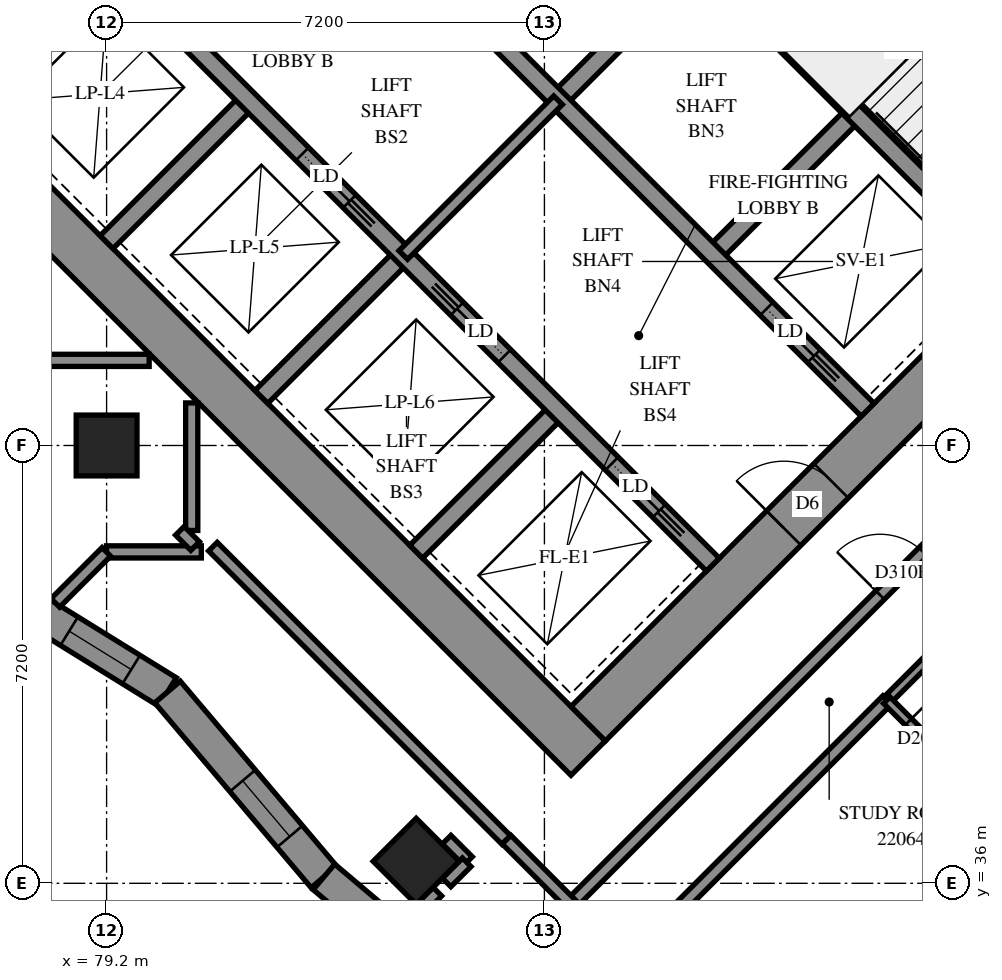
"""IFC4 building model, lengths in metres.
Left out: names, types, materials, properties, quantities, classifications, styles, units other than length and angle.
Written with IfcOpenShell. Run it as: python <this file> out.ifc"""

import sys

from ifc_helpers import new_model, si_unit, direction, frame, frame_2d, origin, origin_2d, place, context, subcontext, project, spatial, polyline, rectangle, outline, extrude, element, fill, save


model = new_model("IFC4")
c1 = context("Model", 3, precision=1e-05, world=origin(), true_north=direction((0.0, 1.0)))
c2 = subcontext(c1, "Body", "Model", "MODEL_VIEW")
j1 = project(units=[si_unit("LENGTHUNIT", "METRE"), si_unit("PLANEANGLEUNIT", "RADIAN")], contexts=[c1])
p1 = place(None, origin())
s1 = spatial("IfcSite", under=j1, at=p1, CompositionType="ELEMENT")
p2 = place(p1, origin())
s2 = spatial("IfcBuilding", under=s1, at=p2, CompositionType="ELEMENT")
p3 = place(p2, frame((0.0, 0.0, 84.6)))
s3 = spatial("IfcBuildingStorey", under=s2, at=p3, CompositionType="ELEMENT", Elevation=84.6)
for number, where, z_axis, x_axis in (
    (1, (79.2, 43.2, 0.0), (0.0, 0.0, 1.0), (1.0, 0.0, 0.0)),
    (2, (84.291, 36.362, 0.0), (0.0, 0.0, 1.0), (0.707, -0.707, 0.0)),
):
    element("IfcColumn", number, at=place(p3, frame(where, z_axis=z_axis, x_axis=x_axis)), inside=s3, PredefinedType="COLUMN", context=c2, shape_type="SweptSolid", body=[
        extrude(rectangle(XDim=1.0, YDim=1.0, at=origin_2d()), origin(), (0.0, 0.0, 1.0), 3.1),
    ])
p4 = place(p3, frame((75.806, 49.373, -0.3), z_axis=(0.0, 0.0, 1.0), x_axis=(0.7071067812, -0.7071067812, 0.0)))
e3 = element("IfcWall", 3, at=p4, inside=s3, PredefinedType="SHEAR", context=c2, shape_type="SweptSolid", body=[
    extrude(rectangle(XDim=16.0, YDim=0.8, at=frame_2d((8.0, 0.0))), origin(), (0.0, 0.0, 1.0), 2.7),
])
p5 = place(p3, frame((86.554, 60.121, -0.3), z_axis=(0.0, 0.0, 1.0), x_axis=(0.7071067812, -0.7071067812, 0.0)))
e4 = element("IfcWall", 4, at=p5, inside=s3, PredefinedType="SHEAR", context=c2, shape_type="SweptSolid", body=[
    extrude(rectangle(XDim=16.0, YDim=0.8, at=frame_2d((8.0, 0.0))), origin(), (0.0, 0.0, 1.0), 2.7),
])
p6 = place(p5, frame((10.8, 0.0, 0.3)))
e5 = element("IfcOpeningElement", 5, at=p6, cuts=e4, PredefinedType="OPENING", context=c2, shape_type="SweptSolid", body=[
    extrude(rectangle(XDim=0.8, YDim=2.1, at=frame_2d((0.4, 1.05))), frame((0.0, 0.41, 0.0), z_axis=(0.0, -1.0, 0.0), x_axis=(1.0, 0.0, 0.0)), (0.0, 0.0, 1.0), 0.82),
])
p7 = place(p3, frame((76.372, 49.373, -0.3), z_axis=(0.0, 0.0, 1.0), x_axis=(0.7071067812, 0.7071067812, 0.0)))
e6 = element("IfcWall", 6, at=p7, inside=s3, PredefinedType="SHEAR", context=c2, shape_type="SweptSolid", body=[
    extrude(rectangle(XDim=14.4, YDim=0.8, at=frame_2d((7.2, 0.0))), origin(), (0.0, 0.0, 1.0), 2.7),
])
p8 = place(p7, frame((4.55, 0.0, 0.3)))
e7 = element("IfcOpeningElement", 7, at=p8, cuts=e6, PredefinedType="OPENING", context=c2, shape_type="SweptSolid", body=[
    extrude(rectangle(XDim=1.1, YDim=2.1, at=frame_2d((0.55, 1.05))), frame((0.0, 0.41, 0.0), z_axis=(0.0, -1.0, 0.0), x_axis=(1.0, 0.0, 0.0)), (0.0, 0.0, 1.0), 0.82),
])
p9 = place(p7, frame((11.35, 0.0, 0.3)))
e8 = element("IfcOpeningElement", 8, at=p9, cuts=e6, PredefinedType="OPENING", context=c2, shape_type="SweptSolid", body=[
    extrude(rectangle(XDim=1.1, YDim=2.1, at=frame_2d((0.55, 1.05))), frame((0.0, 0.41, 0.0), z_axis=(0.0, -1.0, 0.0), x_axis=(1.0, 0.0, 0.0)), (0.0, 0.0, 1.0), 0.82),
])
p10 = place(p3, frame((87.12, 38.625, -0.3), z_axis=(0.0, 0.0, 1.0), x_axis=(0.7071067812, 0.7071067812, 0.0)))
e9 = element("IfcWall", 9, at=p10, inside=s3, PredefinedType="SHEAR", context=c2, shape_type="SweptSolid", body=[
    extrude(rectangle(XDim=14.4, YDim=0.8, at=frame_2d((7.2, 0.0))), origin(), (0.0, 0.0, 1.0), 2.7),
])
p11 = place(p10, frame((4.55, 0.0, 0.3)))
e10 = element("IfcOpeningElement", 10, at=p11, cuts=e9, PredefinedType="OPENING", context=c2, shape_type="SweptSolid", body=[
    extrude(rectangle(XDim=1.1, YDim=2.1, at=frame_2d((0.55, 1.05))), frame((0.0, 0.41, 0.0), z_axis=(0.0, -1.0, 0.0), x_axis=(1.0, 0.0, 0.0)), (0.0, 0.0, 1.0), 0.82),
])
p12 = place(p10, frame((11.35, 0.0, 0.3)))
e11 = element("IfcOpeningElement", 11, at=p12, cuts=e9, PredefinedType="OPENING", context=c2, shape_type="SweptSolid", body=[
    extrude(rectangle(XDim=1.1, YDim=2.1, at=frame_2d((0.55, 1.05))), frame((0.0, 0.41, 0.0), z_axis=(0.0, -1.0, 0.0), x_axis=(1.0, 0.0, 0.0)), (0.0, 0.0, 1.0), 0.82),
])
p13 = place(p3, frame((79.2, 46.544, 0.0), z_axis=(0.0, 0.0, 1.0), x_axis=(0.7071219326, 0.7070916295, 0.0)))
e12 = element("IfcWall", 12, at=p13, inside=s3, PredefinedType="SOLIDWALL", context=c2, shape_type="SweptSolid", body=[
    extrude(rectangle(XDim=3.3, YDim=0.3, at=frame_2d((1.65, 0.0))), origin(), (0.0, 0.0, 1.0), 3.1),
])
p14 = place(p3, frame((81.746, 43.999, 0.0), z_axis=(0.0, 0.0, 1.0), x_axis=(0.7071067812, 0.7071067812, 0.0)))
e13 = element("IfcWall", 13, at=p14, inside=s3, PredefinedType="SOLIDWALL", context=c2, shape_type="SweptSolid", body=[
    extrude(rectangle(XDim=3.3, YDim=0.3, at=frame_2d((1.65, 0.0))), origin(), (0.0, 0.0, 1.0), 3.1),
])
p15 = place(p3, frame((86.625, 48.878, 0.0), z_axis=(0.0, 0.0, 1.0), x_axis=(0.7071067812, 0.7071067812, 0.0)))
e14 = element("IfcWall", 14, at=p15, inside=s3, PredefinedType="SOLIDWALL", context=c2, shape_type="SweptSolid", body=[
    extrude(rectangle(XDim=3.3, YDim=0.3, at=frame_2d((1.65, 0.0))), origin(), (0.0, 0.0, 1.0), 3.1),
])
p16 = place(p3, frame((84.291, 41.453, 0.0), z_axis=(0.0, 0.0, 1.0), x_axis=(0.7071067812, 0.7071067812, 0.0)))
e15 = element("IfcWall", 15, at=p16, inside=s3, PredefinedType="SOLIDWALL", context=c2, shape_type="SweptSolid", body=[
    extrude(rectangle(XDim=3.3, YDim=0.3, at=frame_2d((1.65, 0.0))), origin(), (0.0, 0.0, 1.0), 3.1),
])
p17 = place(p3, frame((89.17, 46.332, 0.0), z_axis=(0.0, 0.0, 1.0), x_axis=(0.7071067812, 0.7071067812, 0.0)))
e16 = element("IfcWall", 16, at=p17, inside=s3, PredefinedType="SOLIDWALL", context=c2, shape_type="SweptSolid", body=[
    extrude(rectangle(XDim=3.3, YDim=0.3, at=frame_2d((1.65, 0.0))), origin(), (0.0, 0.0, 1.0), 3.1),
])
p18 = place(p3, frame((78.988, 51.423, 0.0), z_axis=(0.0, 0.0, 1.0), x_axis=(0.7071067812, -0.7071067812, 0.0)))
e17 = element("IfcWall", 17, at=p18, inside=s3, PredefinedType="SOLIDWALL", context=c2, shape_type="SweptSolid", body=[
    extrude(rectangle(XDim=14.4, YDim=0.3, at=frame_2d((7.2, 0.0))), origin(), (0.0, 0.0, 1.0), 3.1),
])
p19 = place(p18, frame((1.25, 0.0, 0.0)))
e18 = element("IfcOpeningElement", 18, at=p19, cuts=e17, PredefinedType="OPENING", context=c2, shape_type="SweptSolid", body=[
    extrude(rectangle(XDim=1.1, YDim=2.1, at=frame_2d((0.55, 1.05))), frame((0.0, 0.16, 0.0), z_axis=(0.0, -1.0, 0.0), x_axis=(1.0, 0.0, 0.0)), (0.0, 0.0, 1.0), 0.32),
])
p20 = place(p18, frame((4.85, 0.0, 0.0)))
e19 = element("IfcOpeningElement", 19, at=p20, cuts=e17, PredefinedType="OPENING", context=c2, shape_type="SweptSolid", body=[
    extrude(rectangle(XDim=1.1, YDim=2.1, at=frame_2d((0.55, 1.05))), frame((0.0, 0.16, 0.0), z_axis=(0.0, -1.0, 0.0), x_axis=(1.0, 0.0, 0.0)), (0.0, 0.0, 1.0), 0.32),
])
p21 = place(p18, frame((8.45, 0.0, 0.0)))
e20 = element("IfcOpeningElement", 20, at=p21, cuts=e17, PredefinedType="OPENING", context=c2, shape_type="SweptSolid", body=[
    extrude(rectangle(XDim=1.1, YDim=2.1, at=frame_2d((0.55, 1.05))), frame((0.0, 0.16, 0.0), z_axis=(0.0, -1.0, 0.0), x_axis=(1.0, 0.0, 0.0)), (0.0, 0.0, 1.0), 0.32),
])
p22 = place(p18, frame((12.05, 0.0, 0.0)))
e21 = element("IfcOpeningElement", 21, at=p22, cuts=e17, PredefinedType="OPENING", context=c2, shape_type="SweptSolid", body=[
    extrude(rectangle(XDim=1.1, YDim=2.1, at=frame_2d((0.55, 1.05))), frame((0.0, 0.16, 0.0), z_axis=(0.0, -1.0, 0.0), x_axis=(1.0, 0.0, 0.0)), (0.0, 0.0, 1.0), 0.32),
])
p23 = place(p3, frame((81.534, 53.969, 0.0), z_axis=(0.0, 0.0, 1.0), x_axis=(0.707103309, -0.7071102534, 0.0)))
e22 = element("IfcWall", 22, at=p23, inside=s3, PredefinedType="SOLIDWALL", context=c2, shape_type="SweptSolid", body=[
    extrude(rectangle(XDim=14.4, YDim=0.3, at=frame_2d((7.2, 0.0))), origin(), (0.0, 0.0, 1.0), 3.1),
])
p24 = place(p23, frame((12.05, 0.0, 0.0)))
e23 = element("IfcOpeningElement", 23, at=p24, cuts=e22, PredefinedType="OPENING", context=c2, shape_type="SweptSolid", body=[
    extrude(rectangle(XDim=1.1, YDim=2.1, at=frame_2d((0.55, 1.05))), frame((0.0, 0.16, 0.0), z_axis=(0.0, -1.0, 0.0), x_axis=(1.0, 0.0, 0.0)), (0.0, 0.0, 1.0), 0.32),
])
p25 = place(p3, frame((88.958, 51.211, 0.0), z_axis=(0.0, 0.0, 1.0), x_axis=(0.7070998367, -0.7071137256, 0.0)))
e24 = element("IfcWall", 24, at=p25, inside=s3, PredefinedType="SOLIDWALL", context=c2, shape_type="SweptSolid", body=[
    extrude(rectangle(XDim=7.2, YDim=0.3, at=frame_2d((3.6, 0.0))), origin(), (0.0, 0.0, 1.0), 3.1),
])
p26 = place(p3, frame((76.681, 41.325, 0.0), z_axis=(0.0, 0.0, 1.0), x_axis=(0.8503819746, -0.5261658458, 0.0)))
e25 = element("IfcWall", 25, at=p26, inside=s3, PredefinedType="SOLIDWALL", context=c2, shape_type="SweptSolid", body=[
    extrude(outline(polyline([(0.04, -0.275), (4.097, -0.275), (4.184, 0.275), (-0.04, 0.275), (0.04, -0.275)])), origin(), (0.0, 0.0, 1.0), 3.1),
])
p27 = place(p26, frame((0.368, 0.0, 0.5)))
e26 = element("IfcOpeningElement", 26, at=p27, cuts=e25, PredefinedType="OPENING", context=c2, shape_type="SweptSolid", body=[
    extrude(rectangle(XDim=1.2, YDim=2.45, at=frame_2d((0.6, 1.225))), frame((0.0, 0.285, 0.0), z_axis=(0.0, -1.0, 0.0), x_axis=(1.0, 0.0, 0.0)), (0.0, 0.0, 1.0), 0.57),
])
p28 = place(p26, frame((2.238, 0.0, 0.5)))
e27 = element("IfcOpeningElement", 27, at=p28, cuts=e25, PredefinedType="OPENING", context=c2, shape_type="SweptSolid", body=[
    extrude(rectangle(XDim=1.2, YDim=2.45, at=frame_2d((0.6, 1.225))), frame((0.0, 0.285, 0.0), z_axis=(0.0, -1.0, 0.0), x_axis=(1.0, 0.0, 0.0)), (0.0, 0.0, 1.0), 0.57),
])
p29 = place(p3, frame((80.202, 39.147, 0.0), z_axis=(0.0, 0.0, 1.0), x_axis=(0.6457632753, -0.7635376823, 0.0)))
e28 = element("IfcWall", 28, at=p29, inside=s3, PredefinedType="SOLIDWALL", context=c2, shape_type="SweptSolid", body=[
    extrude(outline(polyline([(0.044, -0.275), (4.006, -0.275), (3.96, 0.275), (-0.044, 0.275), (0.044, -0.275)])), origin(), (0.0, 0.0, 1.0), 3.1),
])
p30 = place(p29, frame((1.912, 0.0, 0.5)))
e29 = element("IfcOpeningElement", 29, at=p30, cuts=e28, PredefinedType="OPENING", context=c2, shape_type="SweptSolid", body=[
    extrude(rectangle(XDim=1.2, YDim=2.45, at=frame_2d((0.6, 1.225))), frame((0.0, 0.285, 0.0), z_axis=(0.0, -1.0, 0.0), x_axis=(1.0, 0.0, 0.0)), (0.0, 0.0, 1.0), 0.57),
])
p31 = place(p3, frame((82.774, 36.105, 0.0), z_axis=(0.0, 0.0, 1.0), x_axis=(0.7635423019, -0.6457578131, 0.0)))
e30 = element("IfcWall", 30, at=p31, inside=s3, PredefinedType="SOLIDWALL", context=c2, shape_type="SweptSolid", body=[
    extrude(outline(polyline([(-0.023, -0.275), (3.939, -0.275), (3.985, 0.275), (0.023, 0.275), (-0.023, -0.275)])), origin(), (0.0, 0.0, 1.0), 3.1),
])
p32 = place(p31, frame((1.728, 0.0, 0.5)))
e31 = element("IfcOpeningElement", 31, at=p32, cuts=e30, PredefinedType="OPENING", context=c2, shape_type="SweptSolid", body=[
    extrude(rectangle(XDim=1.2, YDim=2.45, at=frame_2d((0.6, 1.225))), frame((0.0, 0.285, 0.0), z_axis=(0.0, -1.0, 0.0), x_axis=(1.0, 0.0, 0.0)), (0.0, 0.0, 1.0), 0.57),
])
p33 = place(p3, frame((91.313, 53.354, 0.0), z_axis=(0.0, 0.0, 1.0), x_axis=(0.7071140275, -0.7070995348, 0.0)))
e32 = element("IfcWall", 32, at=p33, inside=s3, PredefinedType="PARTITIONING", context=c2, shape_type="SweptSolid", body=[
    extrude(rectangle(XDim=6.9, YDim=0.15, at=frame_2d((3.45, 0.0))), origin(), (0.0, 0.0, 1.0), 3.1),
])
p34 = place(p3, frame((84.079, 46.332, 0.0), z_axis=(0.0, 0.0, 1.0), x_axis=(0.7071067812, 0.7071067812, 0.0)))
e33 = element("IfcWall", 33, at=p34, inside=s3, PredefinedType="PARTITIONING", context=c2, shape_type="SweptSolid", body=[
    extrude(rectangle(XDim=3.6, YDim=0.2, at=frame_2d((1.8, 0.0))), origin(), (0.0, 0.0, 1.0), 3.1),
])
p35 = place(p3, frame((87.894, 61.461, 0.0), z_axis=(0.0, 0.0, 1.0), x_axis=(0.7071067812, -0.7071067812, 0.0)))
e34 = element("IfcWall", 34, at=p35, inside=s3, PredefinedType="PARTITIONING", context=c2, shape_type="SweptSolid", body=[
    extrude(rectangle(XDim=17.5, YDim=0.2, at=frame_2d((8.75, 0.0))), origin(), (0.0, 0.0, 1.0), 3.1),
])
p36 = place(p35, frame((8.735, 0.0, 0.0)))
e35 = element("IfcOpeningElement", 35, at=p36, cuts=e34, PredefinedType="OPENING", context=c2, shape_type="SweptSolid", body=[
    extrude(rectangle(XDim=0.9, YDim=2.1, at=frame_2d((0.45, 1.05))), frame((0.0, 0.11, 0.0), z_axis=(0.0, -1.0, 0.0), x_axis=(1.0, 0.0, 0.0)), (0.0, 0.0, 1.0), 0.22),
])
p37 = place(p3, frame((86.835, 35.655, 0.0), z_axis=(0.0, 0.0, 1.0), x_axis=(0.7071067812, 0.7071067812, 0.0)))
e36 = element("IfcWall", 36, at=p37, inside=s3, PredefinedType="PARTITIONING", context=c2, shape_type="SweptSolid", body=[
    extrude(rectangle(XDim=8.451, YDim=0.2, at=frame_2d((4.226, 0.0))), origin(), (0.0, 0.0, 1.0), 3.1),
])
p38 = place(p37, frame((7.192, 0.0, 0.0)))
e37 = element("IfcOpeningElement", 37, at=p38, cuts=e36, PredefinedType="OPENING", context=c2, shape_type="SweptSolid", body=[
    extrude(rectangle(XDim=1.0, YDim=2.1, at=frame_2d((0.5, 1.05))), frame((0.0, 0.11, 0.0), z_axis=(0.0, -1.0, 0.0), x_axis=(1.0, 0.0, 0.0)), (0.0, 0.0, 1.0), 0.22),
])
p39 = place(p3, frame((86.349, 33.323, 0.0), z_axis=(0.0, 0.0, 1.0), x_axis=(0.7069824569, 0.7072310836, 0.0)))
e38 = element("IfcWall", 38, at=p39, inside=s3, PredefinedType="PARTITIONING", context=c2, shape_type="SweptSolid", body=[
    extrude(rectangle(XDim=8.044, YDim=0.2, at=frame_2d((4.022, 0.0))), origin(), (0.0, 0.0, 1.0), 3.1),
])
p40 = place(p3, frame((80.948, 41.536, 0.0), z_axis=(0.0, 0.0, 1.0), x_axis=(0.7071067812, -0.7071067812, 0.0)))
e39 = element("IfcWall", 39, at=p40, inside=s3, PredefinedType="PARTITIONING", context=c2, shape_type="SweptSolid", body=[
    extrude(rectangle(XDim=6.822, YDim=0.2, at=frame_2d((3.411, 0.0))), origin(), (0.0, 0.0, 1.0), 3.1),
])
p41 = place(p3, frame((89.881, 31.771, 0.0), z_axis=(0.0, 0.0, 1.0), x_axis=(0.7071067812, 0.7071067812, 0.0)))
e40 = element("IfcWall", 40, at=p41, inside=s3, PredefinedType="PARTITIONING", context=c2, shape_type="SweptSolid", body=[
    extrude(rectangle(XDim=5.787, YDim=0.2, at=frame_2d((2.893, 0.0))), origin(), (0.0, 0.0, 1.0), 3.1),
])
p42 = place(p3, frame((92.037, 39.011, 0.0), z_axis=(0.0, 0.0, 1.0), x_axis=(0.7075233388, 0.706689978, 0.0)))
e41 = element("IfcWall", 41, at=p42, inside=s3, PredefinedType="PARTITIONING", context=c2, shape_type="SweptSolid", body=[
    extrude(rectangle(XDim=2.4, YDim=0.15, at=frame_2d((1.2, 0.0))), origin(), (0.0, 0.0, 1.0), 3.1),
])
for number, where, z_axis, x_axis in (
    (42, (77.802, 44.6, 0.0), (0.0, 0.0, 1.0), (1.0, 0.0, 0.0)),
    (43, (80.6, 41.802, 0.0), (0.0, 0.0, 1.0), (0.0, 1.0, 0.0)),
):
    element("IfcWall", number, at=place(p3, frame(where, z_axis=z_axis, x_axis=x_axis)), inside=s3, PredefinedType="PARTITIONING", context=c2, shape_type="SweptSolid", body=[
        extrude(rectangle(XDim=2.098, YDim=0.2, at=frame_2d((1.049, 0.0))), origin(), (0.0, 0.0, 1.0), 3.1),
    ])
p43 = place(p3, frame((92.031, 39.011, 0.0), z_axis=(0.0, 0.0, 1.0), x_axis=(0.7071067812, -0.7071067812, 0.0)))
e44 = element("IfcWall", 44, at=p43, inside=s3, PredefinedType="PARTITIONING", context=c2, shape_type="SweptSolid", body=[
    extrude(rectangle(XDim=1.901, YDim=0.15, at=frame_2d((0.95, 0.0))), origin(), (0.0, 0.0, 1.0), 3.1),
])
p44 = place(p43, frame((0.502, 0.0, 0.0)))
e45 = element("IfcOpeningElement", 45, at=p44, cuts=e44, PredefinedType="OPENING", context=c2, shape_type="SweptSolid", body=[
    extrude(rectangle(XDim=0.8, YDim=2.1, at=frame_2d((0.4, 1.05))), frame((0.0, 0.085, 0.0), z_axis=(0.0, -1.0, 0.0), x_axis=(1.0, 0.0, 0.0)), (0.0, 0.0, 1.0), 0.17),
])
p45 = place(p3, frame((79.198, 41.45, 0.0), z_axis=(0.0, 0.0, 1.0), x_axis=(1.0, 0.0, 0.0)))
e46 = element("IfcWall", 46, at=p45, inside=s3, PredefinedType="PARTITIONING", context=c2, shape_type="SweptSolid", body=[
    extrude(rectangle(XDim=1.56, YDim=0.2, at=frame_2d((0.78, 0.0))), origin(), (0.0, 0.0, 1.0), 3.1),
])
p46 = place(p3, frame((85.778, 36.718, 0.0), z_axis=(0.0, 0.0, 1.0), x_axis=(0.7064400143, -0.70777292, 0.0)))
e47 = element("IfcWall", 47, at=p46, inside=s3, PredefinedType="PARTITIONING", context=c2, shape_type="SweptSolid", body=[
    extrude(rectangle(XDim=1.5, YDim=0.2, at=frame_2d((0.75, 0.0))), origin(), (0.0, 0.0, 1.0), 3.1),
])
p47 = place(p3, frame((78.357, 40.612, 0.0), z_axis=(0.0, 0.0, 1.0), x_axis=(0.7071489323, 0.7070646275, 0.0)))
e48 = element("IfcWall", 48, at=p47, inside=s3, PredefinedType="PARTITIONING", context=c2, shape_type="SweptSolid", body=[
    extrude(rectangle(XDim=1.186, YDim=0.2, at=frame_2d((0.593, 0.0))), origin(), (0.0, 0.0, 1.0), 3.1),
])
p48 = place(p3, frame((84.111, 35.335, 0.0), z_axis=(0.0, 0.0, 1.0), x_axis=(0.7070398235, 0.7071737325, 0.0)))
e49 = element("IfcWall", 49, at=p48, inside=s3, PredefinedType="PARTITIONING", context=c2, shape_type="SweptSolid", body=[
    extrude(rectangle(XDim=0.747, YDim=0.2, at=frame_2d((0.373, 0.0))), origin(), (0.0, 0.0, 1.0), 3.1),
])
p49 = place(p3, frame((84.792, 36.718, 0.0), z_axis=(0.0, 0.0, 1.0), x_axis=(0.7071067812, -0.7071067812, 0.0)))
e50 = element("IfcWall", 50, at=p49, inside=s3, PredefinedType="PARTITIONING", context=c2, shape_type="SweptSolid", body=[
    extrude(rectangle(XDim=0.498, YDim=0.2, at=frame_2d((0.249, 0.0))), origin(), (0.0, 0.0, 1.0), 3.1),
])
p50 = place(p3, frame((84.791, 36.015, 0.0), z_axis=(0.0, 0.0, 1.0), x_axis=(0.7071067812, 0.7071067812, 0.0)))
e51 = element("IfcWall", 51, at=p50, inside=s3, PredefinedType="PARTITIONING", context=c2, shape_type="SweptSolid", body=[
    extrude(rectangle(XDim=0.468, YDim=0.2, at=frame_2d((0.234, 0.0))), origin(), (0.0, 0.0, 1.0), 3.1),
])
p51 = place(p3, frame((80.405, 41.797, 0.0), z_axis=(0.0, 0.0, 1.0), x_axis=(0.7071067812, -0.7071067812, 0.0)))
e52 = element("IfcWall", 52, at=p51, inside=s3, PredefinedType="PARTITIONING", context=c2, shape_type="SweptSolid", body=[
    extrude(rectangle(XDim=0.355, YDim=0.2, at=frame_2d((0.177, 0.0))), origin(), (0.0, 0.0, 1.0), 3.1),
])
p52 = place(p28, origin())
e53 = element("IfcWindow", 53, at=p52, inside=s3, PartitioningType="SINGLE_PANEL", PredefinedType="WINDOW", context=c2, shape_type="SweptSolid", body=[
    extrude(rectangle(XDim=1.2, YDim=2.45, at=frame_2d((0.6, 1.225))), frame((0.0, 0.155, 0.0), z_axis=(0.0, -1.0, 0.0), x_axis=(1.0, 0.0, 0.0)), (0.0, 0.0, 1.0), 0.06),
])
fill(e27, e53)
p53 = place(p30, origin())
e54 = element("IfcWindow", 54, at=p53, inside=s3, PartitioningType="SINGLE_PANEL", PredefinedType="WINDOW", context=c2, shape_type="SweptSolid", body=[
    extrude(rectangle(XDim=1.2, YDim=2.45, at=frame_2d((0.6, 1.225))), frame((0.0, 0.155, 0.0), z_axis=(0.0, -1.0, 0.0), x_axis=(1.0, 0.0, 0.0)), (0.0, 0.0, 1.0), 0.06),
])
fill(e29, e54)
p54 = place(p11, origin())
e55 = element("IfcDoor", 55, at=p54, inside=s3, OperationType="DOUBLE_DOOR_SINGLE_SWING", PredefinedType="DOOR", context=c2, shape_type="SweptSolid", body=[
    extrude(rectangle(XDim=1.1, YDim=2.1, at=frame_2d((0.55, 1.05))), frame((0.0, 0.025, 0.0), z_axis=(0.0, -1.0, 0.0), x_axis=(1.0, 0.0, 0.0)), (0.0, 0.0, 1.0), 0.05),
])
fill(e10, e55)
p55 = place(p20, origin())
e56 = element("IfcDoor", 56, at=p55, inside=s3, OperationType="SLIDING_TO_RIGHT", PredefinedType="DOOR", context=c2, shape_type="SweptSolid", body=[
    extrude(rectangle(XDim=1.1, YDim=2.1, at=frame_2d((0.55, 1.05))), frame((0.0, 0.025, 0.0), z_axis=(0.0, -1.0, 0.0), x_axis=(1.0, 0.0, 0.0)), (0.0, 0.0, 1.0), 0.05),
])
fill(e19, e56)
p56 = place(p21, origin())
e57 = element("IfcDoor", 57, at=p56, inside=s3, OperationType="SLIDING_TO_LEFT", PredefinedType="DOOR", context=c2, shape_type="SweptSolid", body=[
    extrude(rectangle(XDim=1.1, YDim=2.1, at=frame_2d((0.55, 1.05))), frame((0.0, 0.025, 0.0), z_axis=(0.0, -1.0, 0.0), x_axis=(1.0, 0.0, 0.0)), (0.0, 0.0, 1.0), 0.05),
])
fill(e20, e57)
p57 = place(p22, origin())
e58 = element("IfcDoor", 58, at=p57, inside=s3, OperationType="SLIDING_TO_RIGHT", PredefinedType="DOOR", context=c2, shape_type="SweptSolid", body=[
    extrude(rectangle(XDim=1.1, YDim=2.1, at=frame_2d((0.55, 1.05))), frame((0.0, 0.025, 0.0), z_axis=(0.0, -1.0, 0.0), x_axis=(1.0, 0.0, 0.0)), (0.0, 0.0, 1.0), 0.05),
])
fill(e21, e58)
p58 = place(p24, origin())
e59 = element("IfcDoor", 59, at=p58, inside=s3, OperationType="SLIDING_TO_RIGHT", PredefinedType="DOOR", context=c2, shape_type="SweptSolid", body=[
    extrude(rectangle(XDim=1.1, YDim=2.1, at=frame_2d((0.55, 1.05))), frame((0.0, 0.025, 0.0), z_axis=(0.0, -1.0, 0.0), x_axis=(1.0, 0.0, 0.0)), (0.0, 0.0, 1.0), 0.05),
])
fill(e23, e59)
p59 = place(p38, origin())
e60 = element("IfcDoor", 60, at=p59, inside=s3, OperationType="SINGLE_SWING_RIGHT", PredefinedType="DOOR", context=c2, shape_type="SweptSolid", body=[
    extrude(rectangle(XDim=1.0, YDim=2.1, at=frame_2d((0.5, 1.05))), frame((0.0, 0.025, 0.0), z_axis=(0.0, -1.0, 0.0), x_axis=(1.0, 0.0, 0.0)), (0.0, 0.0, 1.0), 0.05),
])
fill(e37, e60)
p60 = place(p44, origin())
e61 = element("IfcDoor", 61, at=p60, inside=s3, OperationType="SINGLE_SWING_RIGHT", PredefinedType="DOOR", context=c2, shape_type="SweptSolid", body=[
    extrude(rectangle(XDim=0.8, YDim=2.1, at=frame_2d((0.4, 1.05))), frame((0.0, 0.025, 0.0), z_axis=(0.0, -1.0, 0.0), x_axis=(1.0, 0.0, 0.0)), (0.0, 0.0, 1.0), 0.05),
])
fill(e45, e61)
save(model, sys.argv[1])
